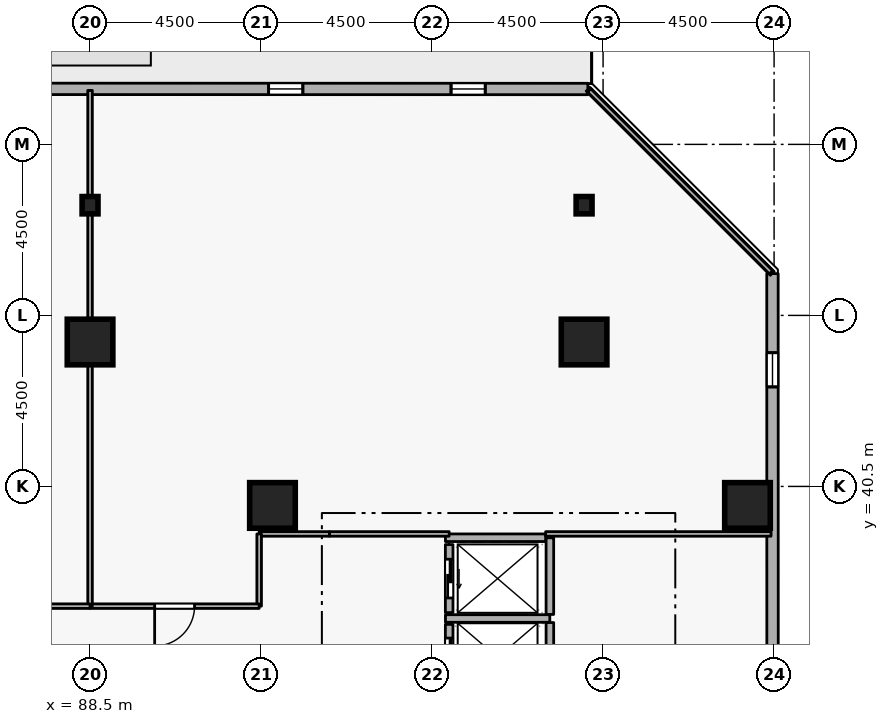
"""IFC4 building model, lengths in metres.
Left out: names, types, materials, properties, quantities, classifications, styles, units other than length and angle.
Written with IfcOpenShell. Run it as: python <this file> out.ifc"""

import sys

from ifc_helpers import new_model, si_unit, direction, frame, frame_2d, origin, origin_2d, place, context, subcontext, project, spatial, rectangle, i_section, extrude, element, fill, save


model = new_model("IFC4")
c1 = context("Model", 3, precision=1e-05, world=origin(), true_north=direction((0.0, 1.0)))
c2 = subcontext(c1, "Body", "Model", "MODEL_VIEW")
j1 = project(units=[si_unit("LENGTHUNIT", "METRE"), si_unit("PLANEANGLEUNIT", "RADIAN")], contexts=[c1])
p1 = place(None, origin())
s1 = spatial("IfcSite", under=j1, at=p1, CompositionType="ELEMENT")
p2 = place(p1, origin())
s2 = spatial("IfcBuilding", under=s1, at=p2, CompositionType="ELEMENT")
p3 = place(p2, frame((0.0, 0.0, 90.9)))
s3 = spatial("IfcBuildingStorey", under=s2, at=p3, CompositionType="ELEMENT", Elevation=90.9)
for number, where, z_axis, x_axis in (
    (1, (105.8, 40.0, 0.0), (0.0, 0.0, 1.0), (1.0, 0.0, 0.0)),
    (2, (101.5, 44.3, 0.0), (0.0, 0.0, 1.0), (1.0, 0.0, 0.0)),
    (3, (88.5, 44.3, 0.0), (0.0, 0.0, 1.0), (1.0, 0.0, 0.0)),
    (4, (93.3, 40.0, 0.0), (0.0, 0.0, 1.0), (1.0, 0.0, 0.0)),
):
    element("IfcColumn", number, at=place(p3, frame(where, z_axis=z_axis, x_axis=x_axis)), inside=s3, PredefinedType="COLUMN", context=c2, shape_type="SweptSolid", body=[
        extrude(rectangle(XDim=1.2, YDim=1.2, at=origin_2d()), origin(), (0.0, 0.0, 1.0), 3.6),
    ])
for number, where, z_axis, x_axis in (
    (5, (101.5, 47.9, 0.0), (0.0, 0.0, 1.0), (1.0, 0.0, 0.0)),
    (6, (88.5, 47.9, 0.0), (0.0, 0.0, 1.0), (1.0, 0.0, 0.0)),
):
    element("IfcColumn", number, at=place(p3, frame(where, z_axis=z_axis, x_axis=x_axis)), inside=s3, PredefinedType="COLUMN", context=c2, shape_type="SweptSolid", body=[
        extrude(i_section(OverallWidth=0.418, OverallDepth=0.456, WebThickness=0.042, FlangeThickness=0.067, FilletRadius=0.015, at=origin_2d()), origin(), (0.0, 0.0, 1.0), 3.6),
    ])
p4 = place(p3, frame((106.465, 11.619, 0.0), z_axis=(0.0, 0.0, 1.0), x_axis=(-0.000212414941, 0.99999997744, 0.0)))
e7 = element("IfcWall", 7, at=p4, inside=s3, PredefinedType="STANDARD", context=c2, shape_type="SweptSolid", body=[
    extrude(rectangle(XDim=34.481, YDim=0.3, at=frame_2d((17.24, 0.0))), origin(), (0.0, 0.0, 1.0), 2.7),
])
p5 = place(p4, frame((7.5, 0.0, 0.72)))
e8 = element("IfcOpeningElement", 8, at=p5, cuts=e7, PredefinedType="OPENING", context=c2, shape_type="SweptSolid", body=[
    extrude(rectangle(XDim=0.9, YDim=1.75, at=frame_2d((0.45, 0.875))), frame((0.0, 0.16, 0.0), z_axis=(0.0, -1.0, 0.0), x_axis=(1.0, 0.0, 0.0)), (0.0, 0.0, 1.0), 0.32),
])
p6 = place(p4, frame((12.3, 0.0, 0.72)))
e9 = element("IfcOpeningElement", 9, at=p6, cuts=e7, PredefinedType="OPENING", context=c2, shape_type="SweptSolid", body=[
    extrude(rectangle(XDim=0.9, YDim=1.75, at=frame_2d((0.45, 0.875))), frame((0.0, 0.16, 0.0), z_axis=(0.0, -1.0, 0.0), x_axis=(1.0, 0.0, 0.0)), (0.0, 0.0, 1.0), 0.32),
])
p7 = place(p4, frame((17.1, 0.0, 0.72)))
e10 = element("IfcOpeningElement", 10, at=p7, cuts=e7, PredefinedType="OPENING", context=c2, shape_type="SweptSolid", body=[
    extrude(rectangle(XDim=0.9, YDim=1.75, at=frame_2d((0.45, 0.875))), frame((0.0, 0.16, 0.0), z_axis=(0.0, -1.0, 0.0), x_axis=(1.0, 0.0, 0.0)), (0.0, 0.0, 1.0), 0.32),
])
p8 = place(p4, frame((21.9, 0.0, 0.72)))
e11 = element("IfcOpeningElement", 11, at=p8, cuts=e7, PredefinedType="OPENING", context=c2, shape_type="SweptSolid", body=[
    extrude(rectangle(XDim=0.9, YDim=1.75, at=frame_2d((0.45, 0.875))), frame((0.0, 0.16, 0.0), z_axis=(0.0, -1.0, 0.0), x_axis=(1.0, 0.0, 0.0)), (0.0, 0.0, 1.0), 0.32),
])
p9 = place(p4, frame((31.5, 0.0, 0.72)))
e12 = element("IfcOpeningElement", 12, at=p9, cuts=e7, PredefinedType="OPENING", context=c2, shape_type="SweptSolid", body=[
    extrude(rectangle(XDim=0.9, YDim=1.75, at=frame_2d((0.45, 0.875))), frame((0.0, 0.16, 0.0), z_axis=(0.0, -1.0, 0.0), x_axis=(1.0, 0.0, 0.0)), (0.0, 0.0, 1.0), 0.32),
])
p10 = place(p3, frame((101.599, 50.957, 0.0), z_axis=(0.0, 0.0, 1.0), x_axis=(-0.99999997744, 0.000212414941, 0.0)))
e13 = element("IfcWall", 13, at=p10, inside=s3, PredefinedType="STANDARD", context=c2, shape_type="SweptSolid", body=[
    extrude(rectangle(XDim=34.481, YDim=0.3, at=frame_2d((17.24, 0.0))), origin(), (0.0, 0.0, 1.0), 2.7),
])
p11 = place(p10, frame((19.04, 0.0, 0.0)))
e14 = element("IfcOpeningElement", 14, at=p11, cuts=e13, PredefinedType="OPENING", context=c2, shape_type="SweptSolid", body=[
    extrude(rectangle(XDim=1.0, YDim=2.08, at=frame_2d((0.5, 1.04))), frame((0.0, 0.16, 0.0), z_axis=(0.0, -1.0, 0.0), x_axis=(1.0, 0.0, 0.0)), (0.0, 0.0, 1.0), 0.32),
])
p12 = place(p10, frame((2.7, 0.0, 0.72)))
e15 = element("IfcOpeningElement", 15, at=p12, cuts=e13, PredefinedType="OPENING", context=c2, shape_type="SweptSolid", body=[
    extrude(rectangle(XDim=0.9, YDim=1.75, at=frame_2d((0.45, 0.875))), frame((0.0, 0.16, 0.0), z_axis=(0.0, -1.0, 0.0), x_axis=(1.0, 0.0, 0.0)), (0.0, 0.0, 1.0), 0.32),
])
p13 = place(p10, frame((7.5, 0.0, 0.72)))
e16 = element("IfcOpeningElement", 16, at=p13, cuts=e13, PredefinedType="OPENING", context=c2, shape_type="SweptSolid", body=[
    extrude(rectangle(XDim=0.9, YDim=1.75, at=frame_2d((0.45, 0.875))), frame((0.0, 0.16, 0.0), z_axis=(0.0, -1.0, 0.0), x_axis=(1.0, 0.0, 0.0)), (0.0, 0.0, 1.0), 0.32),
])
p14 = place(p10, frame((17.1, 0.0, 0.72)))
e17 = element("IfcOpeningElement", 17, at=p14, cuts=e13, PredefinedType="OPENING", context=c2, shape_type="SweptSolid", body=[
    extrude(rectangle(XDim=0.9, YDim=1.75, at=frame_2d((0.45, 0.875))), frame((0.0, 0.16, 0.0), z_axis=(0.0, -1.0, 0.0), x_axis=(1.0, 0.0, 0.0)), (0.0, 0.0, 1.0), 0.32),
])
p15 = place(p10, frame((21.9, 0.0, 0.72)))
e18 = element("IfcOpeningElement", 18, at=p15, cuts=e13, PredefinedType="OPENING", context=c2, shape_type="SweptSolid", body=[
    extrude(rectangle(XDim=0.9, YDim=1.75, at=frame_2d((0.45, 0.875))), frame((0.0, 0.16, 0.0), z_axis=(0.0, -1.0, 0.0), x_axis=(1.0, 0.0, 0.0)), (0.0, 0.0, 1.0), 0.32),
])
p16 = place(p10, frame((26.7, 0.0, 0.72)))
e19 = element("IfcOpeningElement", 19, at=p16, cuts=e13, PredefinedType="OPENING", context=c2, shape_type="SweptSolid", body=[
    extrude(rectangle(XDim=0.9, YDim=1.75, at=frame_2d((0.45, 0.875))), frame((0.0, 0.16, 0.0), z_axis=(0.0, -1.0, 0.0), x_axis=(1.0, 0.0, 0.0)), (0.0, 0.0, 1.0), 0.32),
])
p17 = place(p10, frame((31.5, 0.0, 0.72)))
e20 = element("IfcOpeningElement", 20, at=p17, cuts=e13, PredefinedType="OPENING", context=c2, shape_type="SweptSolid", body=[
    extrude(rectangle(XDim=0.9, YDim=1.75, at=frame_2d((0.45, 0.875))), frame((0.0, 0.16, 0.0), z_axis=(0.0, -1.0, 0.0), x_axis=(1.0, 0.0, 0.0)), (0.0, 0.0, 1.0), 0.32),
])
p18 = place(p3, frame((97.95, 36.87, 0.0), z_axis=(0.0, 0.0, 1.0), x_axis=(0.0, -1.0, 0.0)))
e21 = element("IfcWall", 21, at=p18, inside=s3, PredefinedType="STANDARD", context=c2, shape_type="SweptSolid", body=[
    extrude(rectangle(XDim=1.74, YDim=0.2, at=frame_2d((0.87, 0.0))), origin(), (0.0, 0.0, 1.0), 3.34),
])
p19 = place(p18, frame((0.36, 0.0, 0.0)))
e22 = element("IfcOpeningElement", 22, at=p19, cuts=e21, PredefinedType="OPENING", context=c2, shape_type="SweptSolid", body=[
    extrude(rectangle(XDim=1.02, YDim=2.06, at=frame_2d((0.51, 1.03))), frame((0.0, 0.11, 0.0), z_axis=(0.0, -1.0, 0.0), x_axis=(1.0, 0.0, 0.0)), (0.0, 0.0, 1.0), 0.22),
])
p20 = place(p3, frame((97.95, 38.97, 0.0), z_axis=(0.0, 0.0, 1.0), x_axis=(0.0, -1.0, 0.0)))
e23 = element("IfcWall", 23, at=p20, inside=s3, PredefinedType="STANDARD", context=c2, shape_type="SweptSolid", body=[
    extrude(rectangle(XDim=1.79, YDim=0.2, at=frame_2d((0.895, 0.0))), origin(), (0.0, 0.0, 1.0), 3.34),
])
p21 = place(p20, frame((0.385, 0.0, 0.0)))
e24 = element("IfcOpeningElement", 24, at=p21, cuts=e23, PredefinedType="OPENING", context=c2, shape_type="SweptSolid", body=[
    extrude(rectangle(XDim=1.02, YDim=2.06, at=frame_2d((0.51, 1.03))), frame((0.0, 0.11, 0.0), z_axis=(0.0, -1.0, 0.0), x_axis=(1.0, 0.0, 0.0)), (0.0, 0.0, 1.0), 0.22),
])
p22 = place(p3, frame((97.852, 37.025, 0.0), z_axis=(0.0, 0.0, 1.0), x_axis=(1.0, 0.0, 0.0)))
e25 = element("IfcWall", 25, at=p22, inside=s3, PredefinedType="STANDARD", context=c2, shape_type="SweptSolid", body=[
    extrude(rectangle(XDim=2.746, YDim=0.2, at=frame_2d((1.373, 0.0))), origin(), (0.0, 0.0, 1.0), 3.34),
])
p23 = place(p3, frame((100.6, 35.062, 0.0), z_axis=(0.0, 0.0, 1.0), x_axis=(0.0, 1.0, 0.0)))
e26 = element("IfcWall", 26, at=p23, inside=s3, PredefinedType="STANDARD", context=c2, shape_type="SweptSolid", body=[
    extrude(rectangle(XDim=1.856, YDim=0.2, at=frame_2d((0.928, 0.0))), origin(), (0.0, 0.0, 1.0), 3.34),
])
p24 = place(p3, frame((100.6, 37.132, 0.0), z_axis=(0.0, 0.0, 1.0), x_axis=(0.0, 1.0, 0.0)))
e27 = element("IfcWall", 27, at=p24, inside=s3, PredefinedType="STANDARD", context=c2, shape_type="SweptSolid", body=[
    extrude(rectangle(XDim=2.016, YDim=0.2, at=frame_2d((1.008, 0.0))), origin(), (0.0, 0.0, 1.0), 3.34),
])
p25 = place(p3, frame((97.852, 39.15, 0.0), z_axis=(0.0, 0.0, 1.0), x_axis=(1.0, 0.0, 0.0)))
e28 = element("IfcWall", 28, at=p25, inside=s3, PredefinedType="STANDARD", context=c2, shape_type="SweptSolid", body=[
    extrude(rectangle(XDim=2.636, YDim=0.2, at=frame_2d((1.318, 0.0))), origin(), (0.0, 0.0, 1.0), 3.34),
])
p26 = place(p3, frame((106.42, 39.25, 0.0), z_axis=(0.0, 0.0, 1.0), x_axis=(-1.0, 0.0, 0.0)))
e29 = element("IfcWall", 29, at=p26, inside=s3, PredefinedType="PARTITIONING", context=c2, shape_type="SweptSolid", body=[
    extrude(rectangle(XDim=5.932, YDim=0.12, at=frame_2d((2.966, 0.0))), origin(), (0.0, 0.0, 1.0), 3.34),
])
p27 = place(p3, frame((97.95, 39.25, 0.0), z_axis=(0.0, 0.0, 1.0), x_axis=(-1.0, 0.0, 0.0)))
e30 = element("IfcWall", 30, at=p27, inside=s3, PredefinedType="PARTITIONING", context=c2, shape_type="SweptSolid", body=[
    extrude(rectangle(XDim=3.15, YDim=0.12, at=frame_2d((1.575, 0.0))), origin(), (0.0, 0.0, 1.0), 3.34),
])
p28 = place(p3, frame((94.8, 39.25, 0.0), z_axis=(0.0, 0.0, 1.0), x_axis=(-1.0, 0.0, 0.0)))
e31 = element("IfcWall", 31, at=p28, inside=s3, PredefinedType="PARTITIONING", context=c2, shape_type="SweptSolid", body=[
    extrude(rectangle(XDim=1.85, YDim=0.12, at=frame_2d((0.925, 0.0))), origin(), (0.0, 0.0, 1.0), 3.34),
])
p29 = place(p3, frame((92.95, 39.25, 0.0), z_axis=(0.0, 0.0, 1.0), x_axis=(0.0, -1.0, 0.0)))
e32 = element("IfcWall", 32, at=p29, inside=s3, PredefinedType="PARTITIONING", context=c2, shape_type="SweptSolid", body=[
    extrude(rectangle(XDim=1.9, YDim=0.12, at=frame_2d((0.95, 0.0))), origin(), (0.0, 0.0, 1.0), 3.34),
])
p30 = place(p3, frame((92.95, 37.35, 0.0), z_axis=(0.0, 0.0, 1.0), x_axis=(-1.0, 0.0, 0.0)))
e33 = element("IfcWall", 33, at=p30, inside=s3, PredefinedType="PARTITIONING", context=c2, shape_type="SweptSolid", body=[
    extrude(rectangle(XDim=4.45, YDim=0.12, at=frame_2d((2.225, 0.0))), origin(), (0.0, 0.0, 1.0), 3.34),
])
p31 = place(p30, frame((1.7, 0.0, 0.0)))
e34 = element("IfcOpeningElement", 34, at=p31, cuts=e33, PredefinedType="OPENING", context=c2, shape_type="SweptSolid", body=[
    extrude(rectangle(XDim=1.05, YDim=2.1, at=frame_2d((0.525, 1.05))), frame((0.0, 0.07, 0.0), z_axis=(0.0, -1.0, 0.0), x_axis=(1.0, 0.0, 0.0)), (0.0, 0.0, 1.0), 0.14),
])
p32 = place(p3, frame((88.5, 37.35, 0.0), z_axis=(0.0, 0.0, 1.0), x_axis=(0.0, 1.0, 0.0)))
e35 = element("IfcWall", 35, at=p32, inside=s3, PredefinedType="PARTITIONING", context=c2, shape_type="SweptSolid", body=[
    extrude(rectangle(XDim=13.57, YDim=0.12, at=frame_2d((6.785, 0.0))), origin(), (0.0, 0.0, 1.0), 2.932),
])
p33 = place(p3, frame((101.635, 50.92, 0.0), z_axis=(0.0, 0.0, 1.0), x_axis=(0.707106781187, -0.707106781187, 0.0)))
e36 = element("IfcWall", 36, at=p33, inside=s3, PredefinedType="PARTITIONING", context=c2, shape_type="SweptSolid", body=[
    extrude(rectangle(XDim=6.768, YDim=0.12, at=frame_2d((3.384, 0.0))), origin(), (0.0, 0.0, 1.0), 3.34),
])
p34 = place(p3, frame((88.5, 37.35, 0.0), z_axis=(0.0, 0.0, 1.0), x_axis=(-1.0, 0.0, 0.0)))
e37 = element("IfcWall", 37, at=p34, inside=s3, PredefinedType="PARTITIONING", context=c2, shape_type="SweptSolid", body=[
    extrude(rectangle(XDim=3.15, YDim=0.12, at=frame_2d((1.575, 0.0))), origin(), (0.0, 0.0, 1.0), 3.34),
])
p35 = place(p34, frame((1.1, 0.0, 0.0)))
e38 = element("IfcOpeningElement", 38, at=p35, cuts=e37, PredefinedType="OPENING", context=c2, shape_type="SweptSolid", body=[
    extrude(rectangle(XDim=0.95, YDim=2.1, at=frame_2d((0.475, 1.05))), frame((0.0, 0.07, 0.0), z_axis=(0.0, -1.0, 0.0), x_axis=(1.0, 0.0, 0.0)), (0.0, 0.0, 1.0), 0.14),
])
p36 = place(p9, origin())
e39 = element("IfcWindow", 39, at=p36, inside=s3, PartitioningType="SINGLE_PANEL", PredefinedType="WINDOW", context=c2, shape_type="SweptSolid", body=[
    extrude(rectangle(XDim=0.9, YDim=1.75, at=frame_2d((0.45, 0.875))), frame((0.0, 0.03, 0.0), z_axis=(0.0, -1.0, 0.0), x_axis=(1.0, 0.0, 0.0)), (0.0, 0.0, 1.0), 0.06),
])
fill(e12, e39)
p37 = place(p12, origin())
e40 = element("IfcWindow", 40, at=p37, inside=s3, PartitioningType="SINGLE_PANEL", PredefinedType="WINDOW", context=c2, shape_type="SweptSolid", body=[
    extrude(rectangle(XDim=0.9, YDim=1.75, at=frame_2d((0.45, 0.875))), frame((0.0, 0.03, 0.0), z_axis=(0.0, -1.0, 0.0), x_axis=(1.0, 0.0, 0.0)), (0.0, 0.0, 1.0), 0.06),
])
fill(e15, e40)
p38 = place(p13, origin())
e41 = element("IfcWindow", 41, at=p38, inside=s3, PartitioningType="SINGLE_PANEL", PredefinedType="WINDOW", context=c2, shape_type="SweptSolid", body=[
    extrude(rectangle(XDim=0.9, YDim=1.75, at=frame_2d((0.45, 0.875))), frame((0.0, 0.03, 0.0), z_axis=(0.0, -1.0, 0.0), x_axis=(1.0, 0.0, 0.0)), (0.0, 0.0, 1.0), 0.06),
])
fill(e16, e41)
p39 = place(p19, origin())
e42 = element("IfcDoor", 42, at=p39, inside=s3, OperationType="SLIDING_TO_LEFT", PredefinedType="DOOR", context=c2, shape_type="SweptSolid", body=[
    extrude(rectangle(XDim=1.02, YDim=2.06, at=frame_2d((0.51, 1.03))), frame((0.0, 0.025, 0.0), z_axis=(0.0, -1.0, 0.0), x_axis=(1.0, 0.0, 0.0)), (0.0, 0.0, 1.0), 0.05),
])
fill(e22, e42)
p40 = place(p21, origin())
e43 = element("IfcDoor", 43, at=p40, inside=s3, OperationType="SLIDING_TO_LEFT", PredefinedType="DOOR", context=c2, shape_type="SweptSolid", body=[
    extrude(rectangle(XDim=1.02, YDim=2.06, at=frame_2d((0.51, 1.03))), frame((0.0, 0.025, 0.0), z_axis=(0.0, -1.0, 0.0), x_axis=(1.0, 0.0, 0.0)), (0.0, 0.0, 1.0), 0.05),
])
fill(e24, e43)
p41 = place(p31, origin())
e44 = element("IfcDoor", 44, at=p41, inside=s3, OperationType="SINGLE_SWING_RIGHT", PredefinedType="DOOR", context=c2, shape_type="SweptSolid", body=[
    extrude(rectangle(XDim=1.05, YDim=2.1, at=frame_2d((0.525, 1.05))), frame((0.0, 0.025, 0.0), z_axis=(0.0, -1.0, 0.0), x_axis=(1.0, 0.0, 0.0)), (0.0, 0.0, 1.0), 0.05),
])
fill(e34, e44)
save(model, sys.argv[1])
